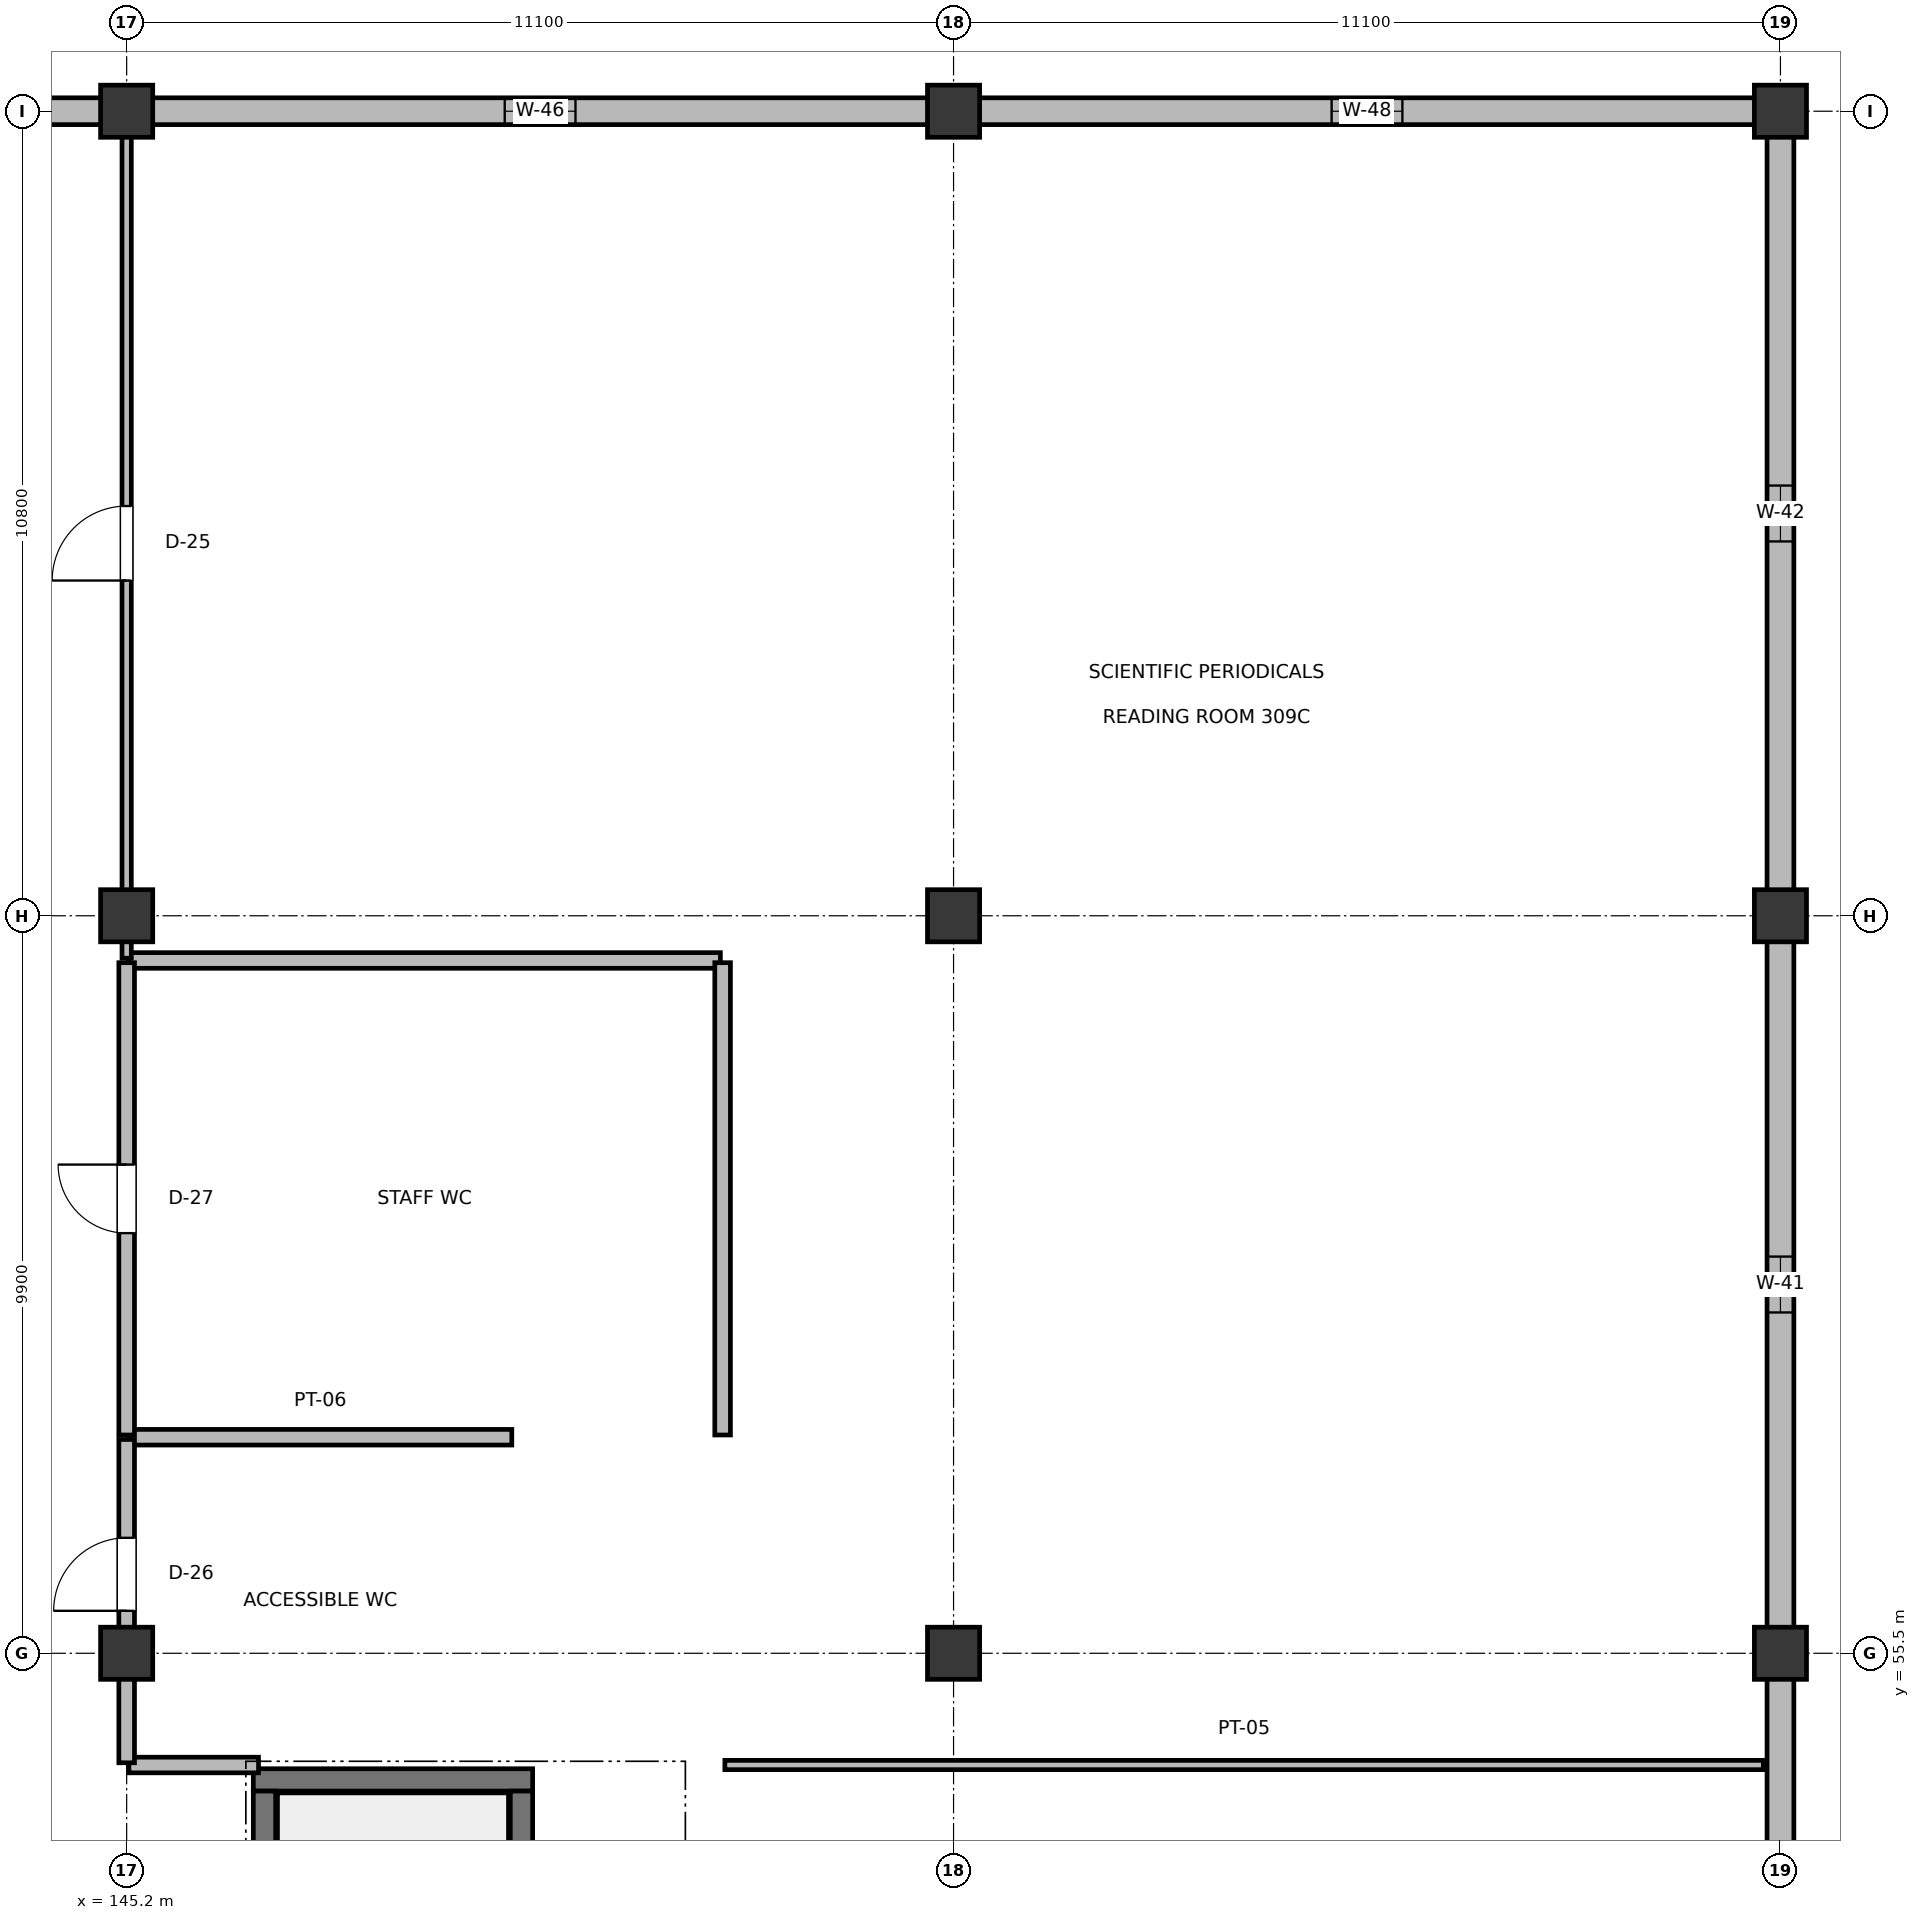
"""IFC4 building model, lengths in metres.
Left out: names, types, materials, properties, quantities, classifications, styles, units other than length and angle.
Written with IfcOpenShell. Run it as: python <this file> out.ifc"""

import sys

from ifc_helpers import new_model, si_unit, direction, frame, frame_2d, origin, origin_2d, place, context, subcontext, project, spatial, rectangle, extrude, element, fill, save


model = new_model("IFC4")
c1 = context("Model", 3, precision=1e-05, world=origin(), true_north=direction((0.0, 1.0)))
c2 = subcontext(c1, "Body", "Model", "MODEL_VIEW")
j1 = project(units=[si_unit("LENGTHUNIT", "METRE"), si_unit("PLANEANGLEUNIT", "RADIAN")], contexts=[c1])
p1 = place(None, origin())
s1 = spatial("IfcSite", under=j1, at=p1, CompositionType="ELEMENT")
p2 = place(p1, origin())
s2 = spatial("IfcBuilding", under=s1, at=p2, CompositionType="ELEMENT")
p3 = place(p2, frame((0.0, 0.0, 15.0)))
s3 = spatial("IfcBuildingStorey", under=s2, at=p3, CompositionType="ELEMENT", Elevation=15.0)
for number, where, z_axis, x_axis in (
    (1, (145.2, 55.5, 0.0), (0.0, 0.0, 1.0), (1.0, 0.0, 0.0)),
    (2, (145.2, 65.4, 0.0), (0.0, 0.0, 1.0), (1.0, 0.0, 0.0)),
    (3, (145.2, 76.2, 0.0), (0.0, 0.0, 1.0), (1.0, 0.0, 0.0)),
    (4, (156.3, 55.5, 0.0), (0.0, 0.0, 1.0), (1.0, 0.0, 0.0)),
    (5, (156.3, 65.4, 0.0), (0.0, 0.0, 1.0), (1.0, 0.0, 0.0)),
    (6, (156.3, 76.2, 0.0), (0.0, 0.0, 1.0), (1.0, 0.0, 0.0)),
    (7, (167.4, 55.5, 0.0), (0.0, 0.0, 1.0), (1.0, 0.0, 0.0)),
    (8, (167.4, 65.4, 0.0), (0.0, 0.0, 1.0), (1.0, 0.0, 0.0)),
    (9, (167.4, 76.2, 0.0), (0.0, 0.0, 1.0), (1.0, 0.0, 0.0)),
):
    element("IfcColumn", number, at=place(p3, frame(where, z_axis=z_axis, x_axis=x_axis)), inside=s3, PredefinedType="COLUMN", context=c2, shape_type="SweptSolid", body=[
        extrude(rectangle(XDim=0.7, YDim=0.7, at=origin_2d()), origin(), (0.0, 0.0, 1.0), 4.5),
    ])
p4 = place(p3, frame((167.4, 45.935, 0.0), z_axis=(0.0, 0.0, 1.0), x_axis=(0.0, 1.0, 0.0)))
e10 = element("IfcWall", 10, at=p4, inside=s3, PredefinedType="SOLIDWALL", context=c2, shape_type="SweptSolid", body=[
    extrude(rectangle(XDim=9.23, YDim=0.36, at=frame_2d((4.615, 0.0))), origin(), (0.0, 0.0, 1.0), 3.945),
])
p5 = place(p4, frame((3.39, 0.0, 0.85)))
e11 = element("IfcOpeningElement", 11, at=p5, cuts=e10, PredefinedType="OPENING", context=c2, shape_type="SweptSolid", body=[
    extrude(rectangle(XDim=2.45, YDim=1.8, at=frame_2d((1.225, 0.9))), frame((0.0, 0.19, 0.0), z_axis=(0.0, -1.0, 0.0), x_axis=(1.0, 0.0, 0.0)), (0.0, 0.0, 1.0), 0.38),
])
p6 = place(p3, frame((167.4, 55.835, 0.0), z_axis=(0.0, 0.0, 1.0), x_axis=(0.0, 1.0, 0.0)))
e12 = element("IfcWall", 12, at=p6, inside=s3, PredefinedType="SOLIDWALL", context=c2, shape_type="SweptSolid", body=[
    extrude(rectangle(XDim=9.23, YDim=0.36, at=frame_2d((4.615, 0.0))), origin(), (0.0, 0.0, 1.0), 3.945),
])
p7 = place(p6, frame((4.24, 0.0, 0.85)))
e13 = element("IfcOpeningElement", 13, at=p7, cuts=e12, PredefinedType="OPENING", context=c2, shape_type="SweptSolid", body=[
    extrude(rectangle(XDim=0.75, YDim=1.15, at=frame_2d((0.375, 0.575))), frame((0.0, 0.19, 0.0), z_axis=(0.0, -1.0, 0.0), x_axis=(1.0, 0.0, 0.0)), (0.0, 0.0, 1.0), 0.38),
])
p8 = place(p3, frame((167.4, 65.735, 0.0), z_axis=(0.0, 0.0, 1.0), x_axis=(0.0, 1.0, 0.0)))
e14 = element("IfcWall", 14, at=p8, inside=s3, PredefinedType="SOLIDWALL", context=c2, shape_type="SweptSolid", body=[
    extrude(rectangle(XDim=10.13, YDim=0.36, at=frame_2d((5.065, 0.0))), origin(), (0.0, 0.0, 1.0), 3.945),
])
p9 = place(p8, frame((4.69, 0.0, 0.85)))
e15 = element("IfcOpeningElement", 15, at=p9, cuts=e14, PredefinedType="OPENING", context=c2, shape_type="SweptSolid", body=[
    extrude(rectangle(XDim=0.75, YDim=1.35, at=frame_2d((0.375, 0.675))), frame((0.0, 0.19, 0.0), z_axis=(0.0, -1.0, 0.0), x_axis=(1.0, 0.0, 0.0)), (0.0, 0.0, 1.0), 0.38),
])
p10 = place(p3, frame((134.135, 76.2, 0.0), z_axis=(0.0, 0.0, 1.0), x_axis=(1.0, 0.0, 0.0)))
e16 = element("IfcWall", 16, at=p10, inside=s3, PredefinedType="SOLIDWALL", context=c2, shape_type="SweptSolid", body=[
    extrude(rectangle(XDim=10.73, YDim=0.36, at=frame_2d((5.365, 0.0))), origin(), (0.0, 0.0, 1.0), 3.405),
])
p11 = place(p10, frame((4.99, 0.0, 0.85)))
e17 = element("IfcOpeningElement", 17, at=p11, cuts=e16, PredefinedType="OPENING", context=c2, shape_type="SweptSolid", body=[
    extrude(rectangle(XDim=0.75, YDim=1.75, at=frame_2d((0.375, 0.875))), frame((0.0, 0.19, 0.0), z_axis=(0.0, -1.0, 0.0), x_axis=(1.0, 0.0, 0.0)), (0.0, 0.0, 1.0), 0.38),
])
p12 = place(p3, frame((145.535, 76.2, 0.0), z_axis=(0.0, 0.0, 1.0), x_axis=(1.0, 0.0, 0.0)))
e18 = element("IfcWall", 18, at=p12, inside=s3, PredefinedType="SOLIDWALL", context=c2, shape_type="SweptSolid", body=[
    extrude(rectangle(XDim=10.43, YDim=0.36, at=frame_2d((5.215, 0.0))), origin(), (0.0, 0.0, 1.0), 3.465),
])
p13 = place(p12, frame((4.74, 0.0, 0.85)))
e19 = element("IfcOpeningElement", 19, at=p13, cuts=e18, PredefinedType="OPENING", context=c2, shape_type="SweptSolid", body=[
    extrude(rectangle(XDim=0.95, YDim=1.35, at=frame_2d((0.475, 0.675))), frame((0.0, 0.19, 0.0), z_axis=(0.0, -1.0, 0.0), x_axis=(1.0, 0.0, 0.0)), (0.0, 0.0, 1.0), 0.38),
])
p14 = place(p3, frame((156.635, 76.2, 0.0), z_axis=(0.0, 0.0, 1.0), x_axis=(1.0, 0.0, 0.0)))
e20 = element("IfcWall", 20, at=p14, inside=s3, PredefinedType="SOLIDWALL", context=c2, shape_type="SweptSolid", body=[
    extrude(rectangle(XDim=10.43, YDim=0.36, at=frame_2d((5.215, 0.0))), origin(), (0.0, 0.0, 1.0), 4.2),
])
p15 = place(p14, frame((4.74, 0.0, 0.85)))
e21 = element("IfcOpeningElement", 21, at=p15, cuts=e20, PredefinedType="OPENING", context=c2, shape_type="SweptSolid", body=[
    extrude(rectangle(XDim=0.95, YDim=1.75, at=frame_2d((0.475, 0.875))), frame((0.0, 0.19, 0.0), z_axis=(0.0, -1.0, 0.0), x_axis=(1.0, 0.0, 0.0)), (0.0, 0.0, 1.0), 0.38),
])
p16 = place(p3, frame((146.9, 53.8, 0.0), z_axis=(0.0, 0.0, 1.0), x_axis=(1.0, 0.0, 0.0)))
e22 = element("IfcWall", 22, at=p16, inside=s3, PredefinedType="SHEAR", context=c2, shape_type="SweptSolid", body=[
    extrude(rectangle(XDim=3.75, YDim=0.3, at=frame_2d((1.875, 0.0))), origin(), (0.0, 0.0, 1.0), 4.28),
])
for number, where, z_axis, x_axis in (
    (23, (147.05, 46.6, 0.0), (0.0, 0.0, 1.0), (0.0, 1.0, 0.0)),
    (24, (150.5, 46.6, 0.0), (0.0, 0.0, 1.0), (0.0, 1.0, 0.0)),
):
    element("IfcWall", number, at=place(p3, frame(where, z_axis=z_axis, x_axis=x_axis)), inside=s3, PredefinedType="SHEAR", context=c2, shape_type="SweptSolid", body=[
        extrude(rectangle(XDim=7.05, YDim=0.3, at=frame_2d((3.525, 0.0))), origin(), (0.0, 0.0, 1.0), 4.28),
    ])
p17 = place(p3, frame((153.23, 54.0, 0.0), z_axis=(0.0, 0.0, 1.0), x_axis=(1.0, 0.0, 0.0)))
e25 = element("IfcWall", 25, at=p17, inside=s3, PredefinedType="PARTITIONING", context=c2, shape_type="SweptSolid", body=[
    extrude(rectangle(XDim=13.94, YDim=0.125, at=frame_2d((6.97, 0.0))), origin(), (0.0, 0.0, 1.0), 3.355),
])
p18 = place(p3, frame((145.23, 58.4, 0.0), z_axis=(0.0, 0.0, 1.0), x_axis=(1.0, 0.0, 0.0)))
e26 = element("IfcWall", 26, at=p18, inside=s3, PredefinedType="PLUMBINGWALL", context=c2, shape_type="SweptSolid", body=[
    extrude(rectangle(XDim=5.14, YDim=0.21, at=frame_2d((2.57, 0.0))), origin(), (0.0, 0.0, 1.0), 3.355),
])
p19 = place(p3, frame((145.23, 54.0, 0.0), z_axis=(0.0, 0.0, 1.0), x_axis=(1.0, 0.0, 0.0)))
e27 = element("IfcWall", 27, at=p19, inside=s3, PredefinedType="PLUMBINGWALL", context=c2, shape_type="SweptSolid", body=[
    extrude(rectangle(XDim=1.74, YDim=0.21, at=frame_2d((0.87, 0.0))), origin(), (0.0, 0.0, 1.0), 3.355),
])
p20 = place(p3, frame((145.2, 54.03, 0.0), z_axis=(0.0, 0.0, 1.0), x_axis=(0.0, 1.0, 0.0)))
e28 = element("IfcWall", 28, at=p20, inside=s3, PredefinedType="PLUMBINGWALL", context=c2, shape_type="SweptSolid", body=[
    extrude(rectangle(XDim=4.34, YDim=0.21, at=frame_2d((2.17, 0.0))), origin(), (0.0, 0.0, 1.0), 3.355),
])
p21 = place(p20, frame((2.04, 0.0, 0.0)))
e29 = element("IfcOpeningElement", 29, at=p21, cuts=e28, PredefinedType="OPENING", context=c2, shape_type="SweptSolid", body=[
    extrude(rectangle(XDim=0.98, YDim=2.1, at=frame_2d((0.49, 1.05))), frame((0.0, 0.115, 0.0), z_axis=(0.0, -1.0, 0.0), x_axis=(1.0, 0.0, 0.0)), (0.0, 0.0, 1.0), 0.23),
])
p22 = place(p3, frame((145.23, 64.8, 0.0), z_axis=(0.0, 0.0, 1.0), x_axis=(1.0, 0.0, 0.0)))
e30 = element("IfcWall", 30, at=p22, inside=s3, PredefinedType="PLUMBINGWALL", context=c2, shape_type="SweptSolid", body=[
    extrude(rectangle(XDim=7.94, YDim=0.21, at=frame_2d((3.97, 0.0))), origin(), (0.0, 0.0, 1.0), 3.355),
])
p23 = place(p3, frame((153.2, 58.43, 0.0), z_axis=(0.0, 0.0, 1.0), x_axis=(0.0, 1.0, 0.0)))
e31 = element("IfcWall", 31, at=p23, inside=s3, PredefinedType="PLUMBINGWALL", context=c2, shape_type="SweptSolid", body=[
    extrude(rectangle(XDim=6.34, YDim=0.21, at=frame_2d((3.17, 0.0))), origin(), (0.0, 0.0, 1.0), 4.18),
])
p24 = place(p3, frame((145.2, 58.43, 0.0), z_axis=(0.0, 0.0, 1.0), x_axis=(0.0, 1.0, 0.0)))
e32 = element("IfcWall", 32, at=p24, inside=s3, PredefinedType="PLUMBINGWALL", context=c2, shape_type="SweptSolid", body=[
    extrude(rectangle(XDim=6.34, YDim=0.21, at=frame_2d((3.17, 0.0))), origin(), (0.0, 0.0, 1.0), 3.355),
])
p25 = place(p24, frame((2.71, 0.0, 0.0)))
e33 = element("IfcOpeningElement", 33, at=p25, cuts=e32, PredefinedType="OPENING", context=c2, shape_type="SweptSolid", body=[
    extrude(rectangle(XDim=0.92, YDim=2.1, at=frame_2d((0.46, 1.05))), frame((0.0, 0.115, 0.0), z_axis=(0.0, -1.0, 0.0), x_axis=(1.0, 0.0, 0.0)), (0.0, 0.0, 1.0), 0.23),
])
p26 = place(p3, frame((145.2, 64.83, 0.0), z_axis=(0.0, 0.0, 1.0), x_axis=(0.0, 1.0, 0.0)))
e34 = element("IfcWall", 34, at=p26, inside=s3, PredefinedType="PARTITIONING", context=c2, shape_type="SweptSolid", body=[
    extrude(rectangle(XDim=11.14, YDim=0.125, at=frame_2d((5.57, 0.0))), origin(), (0.0, 0.0, 1.0), 3.355),
])
p27 = place(p26, frame((5.07, 0.0, 0.0)))
e35 = element("IfcOpeningElement", 35, at=p27, cuts=e34, PredefinedType="OPENING", context=c2, shape_type="SweptSolid", body=[
    extrude(rectangle(XDim=1.0, YDim=2.15, at=frame_2d((0.5, 1.075))), frame((0.0, 0.073, 0.0), z_axis=(0.0, -1.0, 0.0), x_axis=(1.0, 0.0, 0.0)), (0.0, 0.0, 1.0), 0.145),
])
p28 = place(p7, frame((0.75, 0.0, 0.0), z_axis=(0.0, 0.0, 1.0), x_axis=(-1.0, 0.0, 0.0)))
e36 = element("IfcWindow", 36, at=p28, inside=s3, PartitioningType="DOUBLE_PANEL_VERTICAL", PredefinedType="WINDOW", context=c2, shape_type="SweptSolid", body=[
    extrude(rectangle(XDim=0.75, YDim=1.15, at=frame_2d((0.375, 0.575))), frame((0.0, 0.03, 0.0), z_axis=(0.0, -1.0, 0.0), x_axis=(1.0, 0.0, 0.0)), (0.0, 0.0, 1.0), 0.06),
])
fill(e13, e36)
p29 = place(p9, frame((0.75, 0.0, 0.0), z_axis=(0.0, 0.0, 1.0), x_axis=(-1.0, 0.0, 0.0)))
e37 = element("IfcWindow", 37, at=p29, inside=s3, PartitioningType="DOUBLE_PANEL_VERTICAL", PredefinedType="WINDOW", context=c2, shape_type="SweptSolid", body=[
    extrude(rectangle(XDim=0.75, YDim=1.35, at=frame_2d((0.375, 0.675))), frame((0.0, 0.03, 0.0), z_axis=(0.0, -1.0, 0.0), x_axis=(1.0, 0.0, 0.0)), (0.0, 0.0, 1.0), 0.06),
])
fill(e15, e37)
p30 = place(p13, origin())
e38 = element("IfcWindow", 38, at=p30, inside=s3, PartitioningType="DOUBLE_PANEL_VERTICAL", PredefinedType="WINDOW", context=c2, shape_type="SweptSolid", body=[
    extrude(rectangle(XDim=0.95, YDim=1.35, at=frame_2d((0.475, 0.675))), frame((0.0, 0.03, 0.0), z_axis=(0.0, -1.0, 0.0), x_axis=(1.0, 0.0, 0.0)), (0.0, 0.0, 1.0), 0.06),
])
fill(e19, e38)
p31 = place(p15, origin())
e39 = element("IfcWindow", 39, at=p31, inside=s3, PartitioningType="DOUBLE_PANEL_VERTICAL", PredefinedType="WINDOW", context=c2, shape_type="SweptSolid", body=[
    extrude(rectangle(XDim=0.95, YDim=1.75, at=frame_2d((0.475, 0.875))), frame((0.0, 0.03, 0.0), z_axis=(0.0, -1.0, 0.0), x_axis=(1.0, 0.0, 0.0)), (0.0, 0.0, 1.0), 0.06),
])
fill(e21, e39)
p32 = place(p21, origin())
e40 = element("IfcDoor", 40, at=p32, inside=s3, OperationType="SINGLE_SWING_LEFT", PredefinedType="DOOR", context=c2, shape_type="SweptSolid", body=[
    extrude(rectangle(XDim=0.98, YDim=2.1, at=frame_2d((0.49, 1.05))), frame((0.0, 0.025, 0.0), z_axis=(0.0, -1.0, 0.0), x_axis=(1.0, 0.0, 0.0)), (0.0, 0.0, 1.0), 0.05),
])
fill(e29, e40)
p33 = place(p25, origin())
e41 = element("IfcDoor", 41, at=p33, inside=s3, OperationType="SINGLE_SWING_RIGHT", PredefinedType="DOOR", context=c2, shape_type="SweptSolid", body=[
    extrude(rectangle(XDim=0.92, YDim=2.1, at=frame_2d((0.46, 1.05))), frame((0.0, 0.025, 0.0), z_axis=(0.0, -1.0, 0.0), x_axis=(1.0, 0.0, 0.0)), (0.0, 0.0, 1.0), 0.05),
])
fill(e33, e41)
p34 = place(p27, origin())
e42 = element("IfcDoor", 42, at=p34, inside=s3, OperationType="SINGLE_SWING_LEFT", PredefinedType="DOOR", context=c2, shape_type="SweptSolid", body=[
    extrude(rectangle(XDim=1.0, YDim=2.15, at=frame_2d((0.5, 1.075))), frame((0.0, 0.025, 0.0), z_axis=(0.0, -1.0, 0.0), x_axis=(1.0, 0.0, 0.0)), (0.0, 0.0, 1.0), 0.05),
])
fill(e35, e42)
save(model, sys.argv[1])
